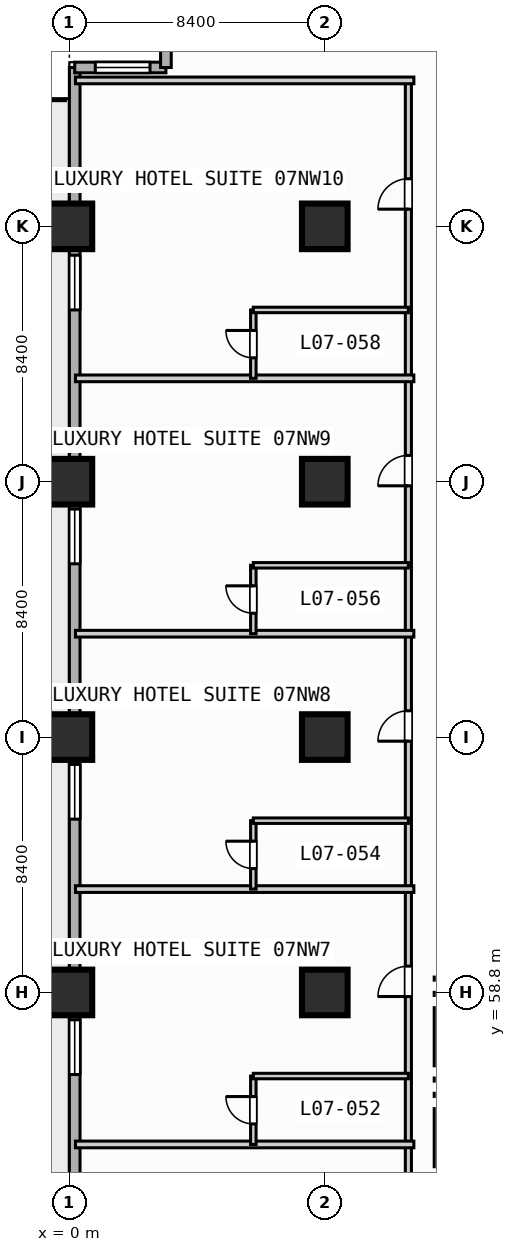
"""IFC4 building model, lengths in metres.
Left out: names, types, materials, properties, quantities, classifications, styles, units other than length and angle.
Written with IfcOpenShell. Run it as: python <this file> out.ifc"""

import sys

from ifc_helpers import new_model, si_unit, direction, frame, frame_2d, origin, origin_2d, place, context, subcontext, project, spatial, rectangle, extrude, element, fill, save


model = new_model("IFC4")
c1 = context("Model", 3, precision=1e-05, world=origin(), true_north=direction((0.0, 1.0)))
c2 = subcontext(c1, "Body", "Model", "MODEL_VIEW")
j1 = project(units=[si_unit("LENGTHUNIT", "METRE"), si_unit("PLANEANGLEUNIT", "RADIAN")], contexts=[c1])
p1 = place(None, origin())
s1 = spatial("IfcSite", under=j1, at=p1, CompositionType="ELEMENT")
p2 = place(p1, origin())
s2 = spatial("IfcBuilding", under=s1, at=p2, CompositionType="ELEMENT")
p3 = place(p2, frame((0.0, 0.0, 35.8)))
s3 = spatial("IfcBuildingStorey", under=s2, at=p3, CompositionType="ELEMENT", Elevation=35.8)
for number, where, z_axis, x_axis in (
    (1, (0.0, 58.8, 0.0), (0.0, 0.0, 1.0), (1.0, 0.0, 0.0)),
    (2, (0.0, 67.2, 0.0), (0.0, 0.0, 1.0), (1.0, 0.0, 0.0)),
    (3, (0.0, 75.6, 0.0), (0.0, 0.0, 1.0), (1.0, 0.0, 0.0)),
    (4, (0.0, 84.0, 0.0), (0.0, 0.0, 1.0), (1.0, 0.0, 0.0)),
    (5, (8.4, 58.8, 0.0), (0.0, 0.0, 1.0), (1.0, 0.0, 0.0)),
    (6, (8.4, 67.2, 0.0), (0.0, 0.0, 1.0), (1.0, 0.0, 0.0)),
    (7, (8.4, 75.6, 0.0), (0.0, 0.0, 1.0), (1.0, 0.0, 0.0)),
    (8, (8.4, 84.0, 0.0), (0.0, 0.0, 1.0), (1.0, 0.0, 0.0)),
):
    element("IfcColumn", number, at=place(p3, frame(where, z_axis=z_axis, x_axis=x_axis)), inside=s3, PredefinedType="COLUMN", context=c2, shape_type="SweptSolid", body=[
        extrude(rectangle(XDim=1.5, YDim=1.5, at=origin_2d()), origin(), (0.0, 0.0, 1.0), 3.8),
    ])
p4 = place(p3, frame((0.175, 3.175, 0.0), z_axis=(0.0, 0.0, 1.0), x_axis=(0.0, 1.0, 0.0)))
e9 = element("IfcWall", 9, at=p4, inside=s3, PredefinedType="STANDARD", context=c2, shape_type="SweptSolid", body=[
    extrude(rectangle(XDim=86.05, YDim=0.35, at=frame_2d((43.025, 0.0))), origin(), (0.0, 0.0, 1.0), 3.55),
])
p5 = place(p4, frame((42.825, 0.0, 0.0)))
e10 = element("IfcOpeningElement", 10, at=p5, cuts=e9, PredefinedType="OPENING", context=c2, shape_type="SweptSolid", body=[
    extrude(rectangle(XDim=1.4, YDim=2.2, at=frame_2d((0.7, 1.1))), frame((0.0, 0.185, 0.0), z_axis=(0.0, -1.0, 0.0), x_axis=(1.0, 0.0, 0.0)), (0.0, 0.0, 1.0), 0.37),
])
p6 = place(p4, frame((2.525, 0.0, 0.85)))
e11 = element("IfcOpeningElement", 11, at=p6, cuts=e9, PredefinedType="OPENING", context=c2, shape_type="SweptSolid", body=[
    extrude(rectangle(XDim=1.8, YDim=1.8, at=frame_2d((0.9, 0.9))), frame((0.0, 0.185, 0.0), z_axis=(0.0, -1.0, 0.0), x_axis=(1.0, 0.0, 0.0)), (0.0, 0.0, 1.0), 0.37),
])
p7 = place(p4, frame((10.925, 0.0, 0.85)))
e12 = element("IfcOpeningElement", 12, at=p7, cuts=e9, PredefinedType="OPENING", context=c2, shape_type="SweptSolid", body=[
    extrude(rectangle(XDim=1.8, YDim=1.8, at=frame_2d((0.9, 0.9))), frame((0.0, 0.185, 0.0), z_axis=(0.0, -1.0, 0.0), x_axis=(1.0, 0.0, 0.0)), (0.0, 0.0, 1.0), 0.37),
])
p8 = place(p4, frame((19.325, 0.0, 0.85)))
e13 = element("IfcOpeningElement", 13, at=p8, cuts=e9, PredefinedType="OPENING", context=c2, shape_type="SweptSolid", body=[
    extrude(rectangle(XDim=1.8, YDim=1.8, at=frame_2d((0.9, 0.9))), frame((0.0, 0.185, 0.0), z_axis=(0.0, -1.0, 0.0), x_axis=(1.0, 0.0, 0.0)), (0.0, 0.0, 1.0), 0.37),
])
p9 = place(p4, frame((27.725, 0.0, 0.85)))
e14 = element("IfcOpeningElement", 14, at=p9, cuts=e9, PredefinedType="OPENING", context=c2, shape_type="SweptSolid", body=[
    extrude(rectangle(XDim=1.8, YDim=1.8, at=frame_2d((0.9, 0.9))), frame((0.0, 0.185, 0.0), z_axis=(0.0, -1.0, 0.0), x_axis=(1.0, 0.0, 0.0)), (0.0, 0.0, 1.0), 0.37),
])
p10 = place(p4, frame((36.125, 0.0, 0.85)))
e15 = element("IfcOpeningElement", 15, at=p10, cuts=e9, PredefinedType="OPENING", context=c2, shape_type="SweptSolid", body=[
    extrude(rectangle(XDim=1.8, YDim=1.8, at=frame_2d((0.9, 0.9))), frame((0.0, 0.185, 0.0), z_axis=(0.0, -1.0, 0.0), x_axis=(1.0, 0.0, 0.0)), (0.0, 0.0, 1.0), 0.37),
])
p11 = place(p4, frame((52.925, 0.0, 0.85)))
e16 = element("IfcOpeningElement", 16, at=p11, cuts=e9, PredefinedType="OPENING", context=c2, shape_type="SweptSolid", body=[
    extrude(rectangle(XDim=1.8, YDim=1.8, at=frame_2d((0.9, 0.9))), frame((0.0, 0.185, 0.0), z_axis=(0.0, -1.0, 0.0), x_axis=(1.0, 0.0, 0.0)), (0.0, 0.0, 1.0), 0.37),
])
p12 = place(p4, frame((61.325, 0.0, 0.85)))
e17 = element("IfcOpeningElement", 17, at=p12, cuts=e9, PredefinedType="OPENING", context=c2, shape_type="SweptSolid", body=[
    extrude(rectangle(XDim=1.8, YDim=1.8, at=frame_2d((0.9, 0.9))), frame((0.0, 0.185, 0.0), z_axis=(0.0, -1.0, 0.0), x_axis=(1.0, 0.0, 0.0)), (0.0, 0.0, 1.0), 0.37),
])
p13 = place(p4, frame((69.725, 0.0, 0.85)))
e18 = element("IfcOpeningElement", 18, at=p13, cuts=e9, PredefinedType="OPENING", context=c2, shape_type="SweptSolid", body=[
    extrude(rectangle(XDim=1.8, YDim=1.8, at=frame_2d((0.9, 0.9))), frame((0.0, 0.185, 0.0), z_axis=(0.0, -1.0, 0.0), x_axis=(1.0, 0.0, 0.0)), (0.0, 0.0, 1.0), 0.37),
])
p14 = place(p4, frame((78.075, 0.0, 0.85)))
e19 = element("IfcOpeningElement", 19, at=p14, cuts=e9, PredefinedType="OPENING", context=c2, shape_type="SweptSolid", body=[
    extrude(rectangle(XDim=1.8, YDim=1.8, at=frame_2d((0.9, 0.9))), frame((0.0, 0.185, 0.0), z_axis=(0.0, -1.0, 0.0), x_axis=(1.0, 0.0, 0.0)), (0.0, 0.0, 1.0), 0.37),
])
p15 = place(p3, frame((0.175, 89.225, 0.0), z_axis=(0.0, 0.0, 1.0), x_axis=(1.0, 0.0, 0.0)))
e20 = element("IfcWall", 20, at=p15, inside=s3, PredefinedType="STANDARD", context=c2, shape_type="SweptSolid", body=[
    extrude(rectangle(XDim=3.0, YDim=0.35, at=frame_2d((1.5, 0.0))), origin(), (0.0, 0.0, 1.0), 3.55),
])
p16 = place(p15, frame((0.677, 0.0, 0.85)))
e21 = element("IfcOpeningElement", 21, at=p16, cuts=e20, PredefinedType="OPENING", context=c2, shape_type="SweptSolid", body=[
    extrude(rectangle(XDim=1.8, YDim=1.8, at=frame_2d((0.9, 0.9))), frame((0.0, 0.185, 0.0), z_axis=(0.0, -1.0, 0.0), x_axis=(1.0, 0.0, 0.0)), (0.0, 0.0, 1.0), 0.37),
])
p17 = place(p3, frame((3.175, 89.225, 0.0), z_axis=(0.0, 0.0, 1.0), x_axis=(0.0, 1.0, 0.0)))
e22 = element("IfcWall", 22, at=p17, inside=s3, PredefinedType="STANDARD", context=c2, shape_type="SweptSolid", body=[
    extrude(rectangle(XDim=3.0, YDim=0.35, at=frame_2d((1.5, 0.0))), origin(), (0.0, 0.0, 1.0), 3.55),
])
p18 = place(p3, frame((11.15, 3.4, 0.0), z_axis=(0.0, 0.0, 1.0), x_axis=(0.0, 1.0, 0.0)))
e23 = element("IfcWall", 23, at=p18, inside=s3, PredefinedType="PARTITIONING", context=c2, shape_type="SweptSolid", body=[
    extrude(rectangle(XDim=85.4, YDim=0.2, at=frame_2d((42.7, 0.0))), origin(), (0.0, 0.0, 1.0), 3.55),
])
p19 = place(p18, frame((4.865, 0.0, 0.0)))
e24 = element("IfcOpeningElement", 24, at=p19, cuts=e23, PredefinedType="OPENING", context=c2, shape_type="SweptSolid", body=[
    extrude(rectangle(XDim=1.0, YDim=2.15, at=frame_2d((0.5, 1.075))), frame((0.0, 0.11, 0.0), z_axis=(0.0, -1.0, 0.0), x_axis=(1.0, 0.0, 0.0)), (0.0, 0.0, 1.0), 0.22),
])
p20 = place(p18, frame((13.265, 0.0, 0.0)))
e25 = element("IfcOpeningElement", 25, at=p20, cuts=e23, PredefinedType="OPENING", context=c2, shape_type="SweptSolid", body=[
    extrude(rectangle(XDim=1.0, YDim=2.15, at=frame_2d((0.5, 1.075))), frame((0.0, 0.11, 0.0), z_axis=(0.0, -1.0, 0.0), x_axis=(1.0, 0.0, 0.0)), (0.0, 0.0, 1.0), 0.22),
])
p21 = place(p18, frame((21.665, 0.0, 0.0)))
e26 = element("IfcOpeningElement", 26, at=p21, cuts=e23, PredefinedType="OPENING", context=c2, shape_type="SweptSolid", body=[
    extrude(rectangle(XDim=1.0, YDim=2.15, at=frame_2d((0.5, 1.075))), frame((0.0, 0.11, 0.0), z_axis=(0.0, -1.0, 0.0), x_axis=(1.0, 0.0, 0.0)), (0.0, 0.0, 1.0), 0.22),
])
p22 = place(p18, frame((30.065, 0.0, 0.0)))
e27 = element("IfcOpeningElement", 27, at=p22, cuts=e23, PredefinedType="OPENING", context=c2, shape_type="SweptSolid", body=[
    extrude(rectangle(XDim=1.0, YDim=2.15, at=frame_2d((0.5, 1.075))), frame((0.0, 0.11, 0.0), z_axis=(0.0, -1.0, 0.0), x_axis=(1.0, 0.0, 0.0)), (0.0, 0.0, 1.0), 0.22),
])
p23 = place(p18, frame((38.465, 0.0, 0.0)))
e28 = element("IfcOpeningElement", 28, at=p23, cuts=e23, PredefinedType="OPENING", context=c2, shape_type="SweptSolid", body=[
    extrude(rectangle(XDim=1.0, YDim=2.15, at=frame_2d((0.5, 1.075))), frame((0.0, 0.11, 0.0), z_axis=(0.0, -1.0, 0.0), x_axis=(1.0, 0.0, 0.0)), (0.0, 0.0, 1.0), 0.22),
])
p24 = place(p18, frame((46.865, 0.0, 0.0)))
e29 = element("IfcOpeningElement", 29, at=p24, cuts=e23, PredefinedType="OPENING", context=c2, shape_type="SweptSolid", body=[
    extrude(rectangle(XDim=1.0, YDim=2.15, at=frame_2d((0.5, 1.075))), frame((0.0, 0.11, 0.0), z_axis=(0.0, -1.0, 0.0), x_axis=(1.0, 0.0, 0.0)), (0.0, 0.0, 1.0), 0.22),
])
p25 = place(p18, frame((55.265, 0.0, 0.0)))
e30 = element("IfcOpeningElement", 30, at=p25, cuts=e23, PredefinedType="OPENING", context=c2, shape_type="SweptSolid", body=[
    extrude(rectangle(XDim=1.0, YDim=2.15, at=frame_2d((0.5, 1.075))), frame((0.0, 0.11, 0.0), z_axis=(0.0, -1.0, 0.0), x_axis=(1.0, 0.0, 0.0)), (0.0, 0.0, 1.0), 0.22),
])
p26 = place(p18, frame((63.665, 0.0, 0.0)))
e31 = element("IfcOpeningElement", 31, at=p26, cuts=e23, PredefinedType="OPENING", context=c2, shape_type="SweptSolid", body=[
    extrude(rectangle(XDim=1.0, YDim=2.15, at=frame_2d((0.5, 1.075))), frame((0.0, 0.11, 0.0), z_axis=(0.0, -1.0, 0.0), x_axis=(1.0, 0.0, 0.0)), (0.0, 0.0, 1.0), 0.22),
])
p27 = place(p18, frame((72.065, 0.0, 0.0)))
e32 = element("IfcOpeningElement", 32, at=p27, cuts=e23, PredefinedType="OPENING", context=c2, shape_type="SweptSolid", body=[
    extrude(rectangle(XDim=1.0, YDim=2.15, at=frame_2d((0.5, 1.075))), frame((0.0, 0.11, 0.0), z_axis=(0.0, -1.0, 0.0), x_axis=(1.0, 0.0, 0.0)), (0.0, 0.0, 1.0), 0.22),
])
p28 = place(p18, frame((81.165, 0.0, 0.0)))
e33 = element("IfcOpeningElement", 33, at=p28, cuts=e23, PredefinedType="OPENING", context=c2, shape_type="SweptSolid", body=[
    extrude(rectangle(XDim=1.0, YDim=2.15, at=frame_2d((0.5, 1.075))), frame((0.0, 0.11, 0.0), z_axis=(0.0, -1.0, 0.0), x_axis=(1.0, 0.0, 0.0)), (0.0, 0.0, 1.0), 0.22),
])
p29 = place(p3, frame((0.2, 53.8, 0.0), z_axis=(0.0, 0.0, 1.0), x_axis=(1.0, 0.0, 0.0)))
e34 = element("IfcWall", 34, at=p29, inside=s3, PredefinedType="PARTITIONING", context=c2, shape_type="SweptSolid", body=[
    extrude(rectangle(XDim=11.13, YDim=0.22, at=frame_2d((5.565, 0.0))), origin(), (0.0, 0.0, 1.0), 3.55),
])
p30 = place(p3, frame((6.05, 53.8, 0.0), z_axis=(0.0, 0.0, 1.0), x_axis=(0.0, 1.0, 0.0)))
e35 = element("IfcWall", 35, at=p30, inside=s3, PredefinedType="PLUMBINGWALL", context=c2, shape_type="SweptSolid", body=[
    extrude(rectangle(XDim=2.25, YDim=0.18, at=frame_2d((1.125, 0.0))), origin(), (0.0, 0.0, 1.0), 3.55),
])
p31 = place(p30, frame((0.675, 0.0, 0.0)))
e36 = element("IfcOpeningElement", 36, at=p31, cuts=e35, PredefinedType="OPENING", context=c2, shape_type="SweptSolid", body=[
    extrude(rectangle(XDim=0.9, YDim=2.1, at=frame_2d((0.45, 1.05))), frame((0.0, 0.1, 0.0), z_axis=(0.0, -1.0, 0.0), x_axis=(1.0, 0.0, 0.0)), (0.0, 0.0, 1.0), 0.2),
])
p32 = place(p3, frame((6.05, 56.05, 0.0), z_axis=(0.0, 0.0, 1.0), x_axis=(1.0, 0.0, 0.0)))
e37 = element("IfcWall", 37, at=p32, inside=s3, PredefinedType="PLUMBINGWALL", context=c2, shape_type="SweptSolid", body=[
    extrude(rectangle(XDim=5.1, YDim=0.18, at=frame_2d((2.55, 0.0))), origin(), (0.0, 0.0, 1.0), 3.55),
])
p33 = place(p3, frame((0.2, 62.2, 0.0), z_axis=(0.0, 0.0, 1.0), x_axis=(1.0, 0.0, 0.0)))
e38 = element("IfcWall", 38, at=p33, inside=s3, PredefinedType="PARTITIONING", context=c2, shape_type="SweptSolid", body=[
    extrude(rectangle(XDim=11.13, YDim=0.22, at=frame_2d((5.565, 0.0))), origin(), (0.0, 0.0, 1.0), 3.55),
])
p34 = place(p3, frame((6.05, 62.2, 0.0), z_axis=(0.0, 0.0, 1.0), x_axis=(0.0, 1.0, 0.0)))
e39 = element("IfcWall", 39, at=p34, inside=s3, PredefinedType="PLUMBINGWALL", context=c2, shape_type="SweptSolid", body=[
    extrude(rectangle(XDim=2.25, YDim=0.18, at=frame_2d((1.125, 0.0))), origin(), (0.0, 0.0, 1.0), 3.55),
])
p35 = place(p34, frame((0.675, 0.0, 0.0)))
e40 = element("IfcOpeningElement", 40, at=p35, cuts=e39, PredefinedType="OPENING", context=c2, shape_type="SweptSolid", body=[
    extrude(rectangle(XDim=0.9, YDim=2.1, at=frame_2d((0.45, 1.05))), frame((0.0, 0.1, 0.0), z_axis=(0.0, -1.0, 0.0), x_axis=(1.0, 0.0, 0.0)), (0.0, 0.0, 1.0), 0.2),
])
p36 = place(p3, frame((6.05, 64.45, 0.0), z_axis=(0.0, 0.0, 1.0), x_axis=(1.0, 0.0, 0.0)))
e41 = element("IfcWall", 41, at=p36, inside=s3, PredefinedType="PLUMBINGWALL", context=c2, shape_type="SweptSolid", body=[
    extrude(rectangle(XDim=5.1, YDim=0.18, at=frame_2d((2.55, 0.0))), origin(), (0.0, 0.0, 1.0), 3.55),
])
p37 = place(p3, frame((0.2, 70.6, 0.0), z_axis=(0.0, 0.0, 1.0), x_axis=(1.0, 0.0, 0.0)))
e42 = element("IfcWall", 42, at=p37, inside=s3, PredefinedType="PARTITIONING", context=c2, shape_type="SweptSolid", body=[
    extrude(rectangle(XDim=11.13, YDim=0.22, at=frame_2d((5.565, 0.0))), origin(), (0.0, 0.0, 1.0), 3.55),
])
p38 = place(p3, frame((6.05, 70.6, 0.0), z_axis=(0.0, 0.0, 1.0), x_axis=(0.0, 1.0, 0.0)))
e43 = element("IfcWall", 43, at=p38, inside=s3, PredefinedType="PLUMBINGWALL", context=c2, shape_type="SweptSolid", body=[
    extrude(rectangle(XDim=2.25, YDim=0.18, at=frame_2d((1.125, 0.0))), origin(), (0.0, 0.0, 1.0), 3.55),
])
p39 = place(p38, frame((0.675, 0.0, 0.0)))
e44 = element("IfcOpeningElement", 44, at=p39, cuts=e43, PredefinedType="OPENING", context=c2, shape_type="SweptSolid", body=[
    extrude(rectangle(XDim=0.9, YDim=2.1, at=frame_2d((0.45, 1.05))), frame((0.0, 0.1, 0.0), z_axis=(0.0, -1.0, 0.0), x_axis=(1.0, 0.0, 0.0)), (0.0, 0.0, 1.0), 0.2),
])
p40 = place(p3, frame((6.05, 72.85, 0.0), z_axis=(0.0, 0.0, 1.0), x_axis=(1.0, 0.0, 0.0)))
e45 = element("IfcWall", 45, at=p40, inside=s3, PredefinedType="PLUMBINGWALL", context=c2, shape_type="SweptSolid", body=[
    extrude(rectangle(XDim=5.1, YDim=0.18, at=frame_2d((2.55, 0.0))), origin(), (0.0, 0.0, 1.0), 3.55),
])
for number, where, z_axis, x_axis in (
    (46, (0.2, 79.0, 0.0), (0.0, 0.0, 1.0), (1.0, 0.0, 0.0)),
    (47, (0.2, 88.8, 0.0), (0.0, 0.0, 1.0), (1.0, 0.0, 0.0)),
):
    element("IfcWall", number, at=place(p3, frame(where, z_axis=z_axis, x_axis=x_axis)), inside=s3, PredefinedType="PARTITIONING", context=c2, shape_type="SweptSolid", body=[
        extrude(rectangle(XDim=11.13, YDim=0.22, at=frame_2d((5.565, 0.0))), origin(), (0.0, 0.0, 1.0), 3.55),
    ])
p41 = place(p3, frame((6.05, 79.0, 0.0), z_axis=(0.0, 0.0, 1.0), x_axis=(0.0, 1.0, 0.0)))
e48 = element("IfcWall", 48, at=p41, inside=s3, PredefinedType="PLUMBINGWALL", context=c2, shape_type="SweptSolid", body=[
    extrude(rectangle(XDim=2.25, YDim=0.18, at=frame_2d((1.125, 0.0))), origin(), (0.0, 0.0, 1.0), 3.55),
])
p42 = place(p41, frame((0.675, 0.0, 0.0)))
e49 = element("IfcOpeningElement", 49, at=p42, cuts=e48, PredefinedType="OPENING", context=c2, shape_type="SweptSolid", body=[
    extrude(rectangle(XDim=0.9, YDim=2.1, at=frame_2d((0.45, 1.05))), frame((0.0, 0.1, 0.0), z_axis=(0.0, -1.0, 0.0), x_axis=(1.0, 0.0, 0.0)), (0.0, 0.0, 1.0), 0.2),
])
p43 = place(p3, frame((6.05, 81.25, 0.0), z_axis=(0.0, 0.0, 1.0), x_axis=(1.0, 0.0, 0.0)))
e50 = element("IfcWall", 50, at=p43, inside=s3, PredefinedType="PLUMBINGWALL", context=c2, shape_type="SweptSolid", body=[
    extrude(rectangle(XDim=5.1, YDim=0.18, at=frame_2d((2.55, 0.0))), origin(), (0.0, 0.0, 1.0), 3.55),
])
p44 = place(p11, origin())
e51 = element("IfcWindow", 51, at=p44, inside=s3, PartitioningType="SINGLE_PANEL", PredefinedType="WINDOW", context=c2, shape_type="SweptSolid", body=[
    extrude(rectangle(XDim=1.8, YDim=1.8, at=frame_2d((0.9, 0.9))), frame((0.0, 0.03, 0.0), z_axis=(0.0, -1.0, 0.0), x_axis=(1.0, 0.0, 0.0)), (0.0, 0.0, 1.0), 0.06),
])
fill(e16, e51)
p45 = place(p12, origin())
e52 = element("IfcWindow", 52, at=p45, inside=s3, PartitioningType="SINGLE_PANEL", PredefinedType="WINDOW", context=c2, shape_type="SweptSolid", body=[
    extrude(rectangle(XDim=1.8, YDim=1.8, at=frame_2d((0.9, 0.9))), frame((0.0, 0.03, 0.0), z_axis=(0.0, -1.0, 0.0), x_axis=(1.0, 0.0, 0.0)), (0.0, 0.0, 1.0), 0.06),
])
fill(e17, e52)
p46 = place(p13, origin())
e53 = element("IfcWindow", 53, at=p46, inside=s3, PartitioningType="SINGLE_PANEL", PredefinedType="WINDOW", context=c2, shape_type="SweptSolid", body=[
    extrude(rectangle(XDim=1.8, YDim=1.8, at=frame_2d((0.9, 0.9))), frame((0.0, 0.03, 0.0), z_axis=(0.0, -1.0, 0.0), x_axis=(1.0, 0.0, 0.0)), (0.0, 0.0, 1.0), 0.06),
])
fill(e18, e53)
p47 = place(p14, origin())
e54 = element("IfcWindow", 54, at=p47, inside=s3, PartitioningType="SINGLE_PANEL", PredefinedType="WINDOW", context=c2, shape_type="SweptSolid", body=[
    extrude(rectangle(XDim=1.8, YDim=1.8, at=frame_2d((0.9, 0.9))), frame((0.0, 0.03, 0.0), z_axis=(0.0, -1.0, 0.0), x_axis=(1.0, 0.0, 0.0)), (0.0, 0.0, 1.0), 0.06),
])
fill(e19, e54)
p48 = place(p16, origin())
e55 = element("IfcWindow", 55, at=p48, inside=s3, PartitioningType="SINGLE_PANEL", PredefinedType="WINDOW", context=c2, shape_type="SweptSolid", body=[
    extrude(rectangle(XDim=1.8, YDim=1.8, at=frame_2d((0.9, 0.9))), frame((0.0, 0.03, 0.0), z_axis=(0.0, -1.0, 0.0), x_axis=(1.0, 0.0, 0.0)), (0.0, 0.0, 1.0), 0.06),
])
fill(e21, e55)
p49 = place(p25, origin())
e56 = element("IfcDoor", 56, at=p49, inside=s3, OperationType="SINGLE_SWING_LEFT", PredefinedType="DOOR", context=c2, shape_type="SweptSolid", body=[
    extrude(rectangle(XDim=1.0, YDim=2.15, at=frame_2d((0.5, 1.075))), frame((0.0, 0.025, 0.0), z_axis=(0.0, -1.0, 0.0), x_axis=(1.0, 0.0, 0.0)), (0.0, 0.0, 1.0), 0.05),
])
fill(e30, e56)
p50 = place(p26, origin())
e57 = element("IfcDoor", 57, at=p50, inside=s3, OperationType="SINGLE_SWING_LEFT", PredefinedType="DOOR", context=c2, shape_type="SweptSolid", body=[
    extrude(rectangle(XDim=1.0, YDim=2.15, at=frame_2d((0.5, 1.075))), frame((0.0, 0.025, 0.0), z_axis=(0.0, -1.0, 0.0), x_axis=(1.0, 0.0, 0.0)), (0.0, 0.0, 1.0), 0.05),
])
fill(e31, e57)
p51 = place(p27, origin())
e58 = element("IfcDoor", 58, at=p51, inside=s3, OperationType="SINGLE_SWING_LEFT", PredefinedType="DOOR", context=c2, shape_type="SweptSolid", body=[
    extrude(rectangle(XDim=1.0, YDim=2.15, at=frame_2d((0.5, 1.075))), frame((0.0, 0.025, 0.0), z_axis=(0.0, -1.0, 0.0), x_axis=(1.0, 0.0, 0.0)), (0.0, 0.0, 1.0), 0.05),
])
fill(e32, e58)
p52 = place(p28, origin())
e59 = element("IfcDoor", 59, at=p52, inside=s3, OperationType="SINGLE_SWING_LEFT", PredefinedType="DOOR", context=c2, shape_type="SweptSolid", body=[
    extrude(rectangle(XDim=1.0, YDim=2.15, at=frame_2d((0.5, 1.075))), frame((0.0, 0.025, 0.0), z_axis=(0.0, -1.0, 0.0), x_axis=(1.0, 0.0, 0.0)), (0.0, 0.0, 1.0), 0.05),
])
fill(e33, e59)
p53 = place(p31, origin())
e60 = element("IfcDoor", 60, at=p53, inside=s3, OperationType="SINGLE_SWING_RIGHT", PredefinedType="DOOR", context=c2, shape_type="SweptSolid", body=[
    extrude(rectangle(XDim=0.9, YDim=2.1, at=frame_2d((0.45, 1.05))), frame((0.0, 0.025, 0.0), z_axis=(0.0, -1.0, 0.0), x_axis=(1.0, 0.0, 0.0)), (0.0, 0.0, 1.0), 0.05),
])
fill(e36, e60)
p54 = place(p35, origin())
e61 = element("IfcDoor", 61, at=p54, inside=s3, OperationType="SINGLE_SWING_RIGHT", PredefinedType="DOOR", context=c2, shape_type="SweptSolid", body=[
    extrude(rectangle(XDim=0.9, YDim=2.1, at=frame_2d((0.45, 1.05))), frame((0.0, 0.025, 0.0), z_axis=(0.0, -1.0, 0.0), x_axis=(1.0, 0.0, 0.0)), (0.0, 0.0, 1.0), 0.05),
])
fill(e40, e61)
p55 = place(p39, origin())
e62 = element("IfcDoor", 62, at=p55, inside=s3, OperationType="SINGLE_SWING_RIGHT", PredefinedType="DOOR", context=c2, shape_type="SweptSolid", body=[
    extrude(rectangle(XDim=0.9, YDim=2.1, at=frame_2d((0.45, 1.05))), frame((0.0, 0.025, 0.0), z_axis=(0.0, -1.0, 0.0), x_axis=(1.0, 0.0, 0.0)), (0.0, 0.0, 1.0), 0.05),
])
fill(e44, e62)
p56 = place(p42, origin())
e63 = element("IfcDoor", 63, at=p56, inside=s3, OperationType="SINGLE_SWING_RIGHT", PredefinedType="DOOR", context=c2, shape_type="SweptSolid", body=[
    extrude(rectangle(XDim=0.9, YDim=2.1, at=frame_2d((0.45, 1.05))), frame((0.0, 0.025, 0.0), z_axis=(0.0, -1.0, 0.0), x_axis=(1.0, 0.0, 0.0)), (0.0, 0.0, 1.0), 0.05),
])
fill(e49, e63)
save(model, sys.argv[1])
